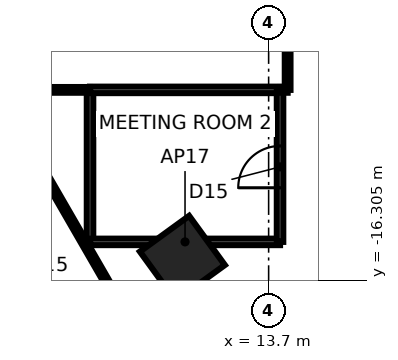
"""IFC4 building model, lengths in metres.
Left out: names, types, materials, properties, quantities, classifications, styles, units other than length and angle.
Written with IfcOpenShell. Run it as: python <this file> out.ifc"""

import sys

from ifc_helpers import new_model, si_unit, direction, frame, frame_2d, origin, origin_2d, place, context, subcontext, project, spatial, rectangle, extrude, element, fill, save


model = new_model("IFC4")
c1 = context("Model", 3, precision=1e-05, world=origin(), true_north=direction((0.0, 1.0)))
c2 = subcontext(c1, "Body", "Model", "MODEL_VIEW")
j1 = project(units=[si_unit("LENGTHUNIT", "METRE"), si_unit("PLANEANGLEUNIT", "RADIAN")], contexts=[c1])
p1 = place(None, origin())
s1 = spatial("IfcSite", under=j1, at=p1, CompositionType="ELEMENT")
p2 = place(p1, origin())
s2 = spatial("IfcBuilding", under=s1, at=p2, CompositionType="ELEMENT")
p3 = place(p2, frame((0.0, 0.0, 147.0)))
s3 = spatial("IfcBuildingStorey", under=s2, at=p3, CompositionType="ELEMENT", Elevation=147.0)
p4 = place(p3, frame((11.43, -15.733, 0.0), z_axis=(0.0, 0.0, 1.0), x_axis=(0.587785252292, -0.809016994375, 0.0)))
e1 = element("IfcColumn", 1, at=p4, inside=s3, PredefinedType="COLUMN", context=c2, shape_type="SweptSolid", body=[
    extrude(rectangle(XDim=1.6, YDim=1.6, at=origin_2d()), origin(), (0.0, 0.0, 1.0), 3.9),
])
p5 = place(p3, frame((11.137, -19.289, 0.0), z_axis=(0.0, 0.0, 1.0), x_axis=(-0.499995827671, 0.866027812666, 0.0)))
e2 = element("IfcWall", 2, at=p5, inside=s3, PredefinedType="PARTITIONING", context=c2, shape_type="SweptSolid", body=[
    extrude(rectangle(XDim=9.225, YDim=0.15, at=frame_2d((4.613, 0.0))), origin(), (0.0, 0.0, 1.0), 3.74),
])
p6 = place(p3, frame((6.0, -11.3, 0.0), z_axis=(0.0, 0.0, 1.0), x_axis=(1.0, 0.0, 0.0)))
e3 = element("IfcWall", 3, at=p6, inside=s3, PredefinedType="PARTITIONING", context=c2, shape_type="SweptSolid", body=[
    extrude(rectangle(XDim=3.0, YDim=0.15, at=frame_2d((1.5, 0.0))), origin(), (0.0, 0.0, 1.0), 3.74),
])
p7 = place(p3, frame((9.0, -11.3, 0.0), z_axis=(0.0, 0.0, 1.0), x_axis=(0.0, -1.0, 0.0)))
e4 = element("IfcWall", 4, at=p7, inside=s3, PredefinedType="PARTITIONING", context=c2, shape_type="SweptSolid", body=[
    extrude(rectangle(XDim=4.0, YDim=0.17, at=frame_2d((2.0, 0.0))), origin(), (0.0, 0.0, 1.0), 3.74),
])
for number, where, z_axis, x_axis in (
    (5, (9.0, -15.3, 0.0), (0.0, 0.0, 1.0), (1.0, 0.0, 0.0)),
    (6, (14.0, -11.3, 0.0), (0.0, 0.0, 1.0), (-1.0, 0.0, 0.0)),
):
    element("IfcWall", number, at=place(p3, frame(where, z_axis=z_axis, x_axis=x_axis)), inside=s3, PredefinedType="PARTITIONING", context=c2, shape_type="SweptSolid", body=[
        extrude(rectangle(XDim=5.0, YDim=0.17, at=frame_2d((2.5, 0.0))), origin(), (0.0, 0.0, 1.0), 3.74),
    ])
p8 = place(p3, frame((14.0, -15.3, 0.0), z_axis=(0.0, 0.0, 1.0), x_axis=(0.0, 1.0, 0.0)))
e7 = element("IfcWall", 7, at=p8, inside=s3, PredefinedType="PARTITIONING", context=c2, shape_type="SweptSolid", body=[
    extrude(rectangle(XDim=4.0, YDim=0.17, at=frame_2d((2.0, 0.0))), origin(), (0.0, 0.0, 1.0), 3.74),
])
p9 = place(p8, frame((1.424, 0.0, 0.0)))
e8 = element("IfcOpeningElement", 8, at=p9, cuts=e7, PredefinedType="OPENING", context=c2, shape_type="SweptSolid", body=[
    extrude(rectangle(XDim=1.1, YDim=2.4, at=frame_2d((0.55, 1.2))), frame((0.0, 0.095, 0.0), z_axis=(0.0, -1.0, 0.0), x_axis=(1.0, 0.0, 0.0)), (0.0, 0.0, 1.0), 0.19),
])
p10 = place(p3, frame((14.0, -11.3, 0.0), z_axis=(0.0, 0.0, 1.0), x_axis=(1.0, 0.0, 0.0)))
e9 = element("IfcWall", 9, at=p10, inside=s3, PredefinedType="PARTITIONING", context=c2, shape_type="SweptSolid", body=[
    extrude(rectangle(XDim=0.2, YDim=0.15, at=frame_2d((0.1, 0.0))), origin(), (0.0, 0.0, 1.0), 3.74),
])
p11 = place(p3, frame((14.2, -11.3, 0.0), z_axis=(0.0, 0.0, 1.0), x_axis=(0.0, 1.0, 0.0)))
e10 = element("IfcWall", 10, at=p11, inside=s3, PredefinedType="PARTITIONING", context=c2, shape_type="SweptSolid", body=[
    extrude(rectangle(XDim=1.8, YDim=0.15, at=frame_2d((0.9, 0.0))), origin(), (0.0, 0.0, 1.0), 3.74),
])
p12 = place(p9, origin())
e11 = element("IfcDoor", 11, at=p12, inside=s3, OperationType="SINGLE_SWING_LEFT", PredefinedType="DOOR", context=c2, shape_type="SweptSolid", body=[
    extrude(rectangle(XDim=1.1, YDim=2.4, at=frame_2d((0.55, 1.2))), frame((0.0, 0.025, 0.0), z_axis=(0.0, -1.0, 0.0), x_axis=(1.0, 0.0, 0.0)), (0.0, 0.0, 1.0), 0.05),
])
fill(e8, e11)
save(model, sys.argv[1])
